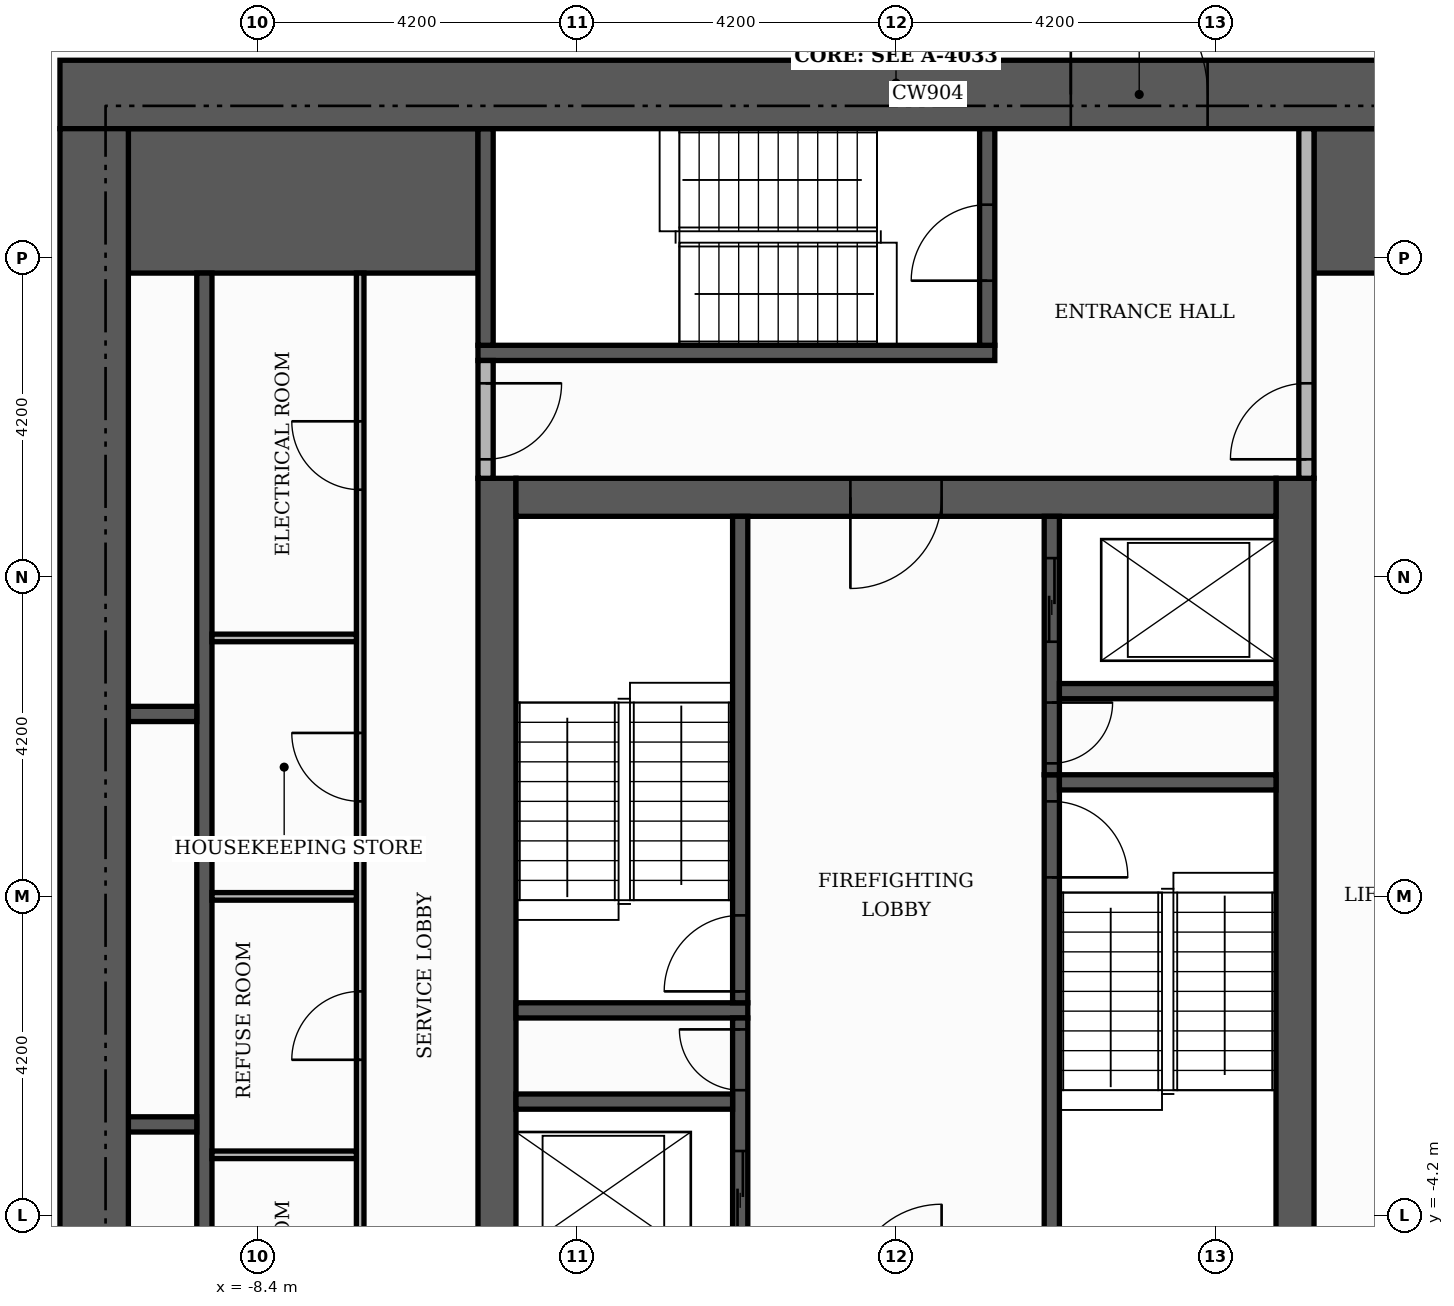
"""IFC4 building model, lengths in metres.
Left out: names, types, materials, properties, quantities, classifications, styles, units other than length and angle.
Written with IfcOpenShell. Run it as: python <this file> out.ifc"""

import sys

from ifc_helpers import new_model, si_unit, direction, frame, frame_2d, origin, place, context, subcontext, project, spatial, rectangle, extrude, element, fill, save


model = new_model("IFC4")
c1 = context("Model", 3, precision=1e-05, world=origin(), true_north=direction((0.0, 1.0)))
c2 = subcontext(c1, "Body", "Model", "MODEL_VIEW")
j1 = project(units=[si_unit("LENGTHUNIT", "METRE"), si_unit("PLANEANGLEUNIT", "RADIAN")], contexts=[c1])
p1 = place(None, origin())
s1 = spatial("IfcSite", under=j1, at=p1, CompositionType="ELEMENT")
p2 = place(p1, origin())
s2 = spatial("IfcBuilding", under=s1, at=p2, CompositionType="ELEMENT")
p3 = place(p2, frame((0.0, 0.0, 196.2)))
s3 = spatial("IfcBuildingStorey", under=s2, at=p3, CompositionType="ELEMENT", Elevation=196.2)
for number, where, z_axis, x_axis in (
    (1, (-5.25, -5.0, 0.0), (0.0, 0.0, 1.0), (0.0, 1.0, 0.0)),
    (2, (5.25, -5.0, 0.0), (0.0, 0.0, 1.0), (0.0, 1.0, 0.0)),
):
    element("IfcWall", number, at=place(p3, frame(where, z_axis=z_axis, x_axis=x_axis)), inside=s3, PredefinedType="SHEAR", context=c2, shape_type="SweptSolid", body=[
        extrude(rectangle(XDim=10.5, YDim=0.5, at=frame_2d((5.25, 0.0))), origin(), (0.0, 0.0, 1.0), 3.48),
    ])
p4 = place(p3, frame((-5.0, 5.25, 0.0), z_axis=(0.0, 0.0, 1.0), x_axis=(1.0, 0.0, 0.0)))
e3 = element("IfcWall", 3, at=p4, inside=s3, PredefinedType="SHEAR", context=c2, shape_type="SweptSolid", body=[
    extrude(rectangle(XDim=10.0, YDim=0.5, at=frame_2d((5.0, 0.0))), origin(), (0.0, 0.0, 1.0), 3.48),
])
p5 = place(p4, frame((4.4, 0.0, 0.0)))
e4 = element("IfcOpeningElement", 4, at=p5, cuts=e3, PredefinedType="OPENING", context=c2, shape_type="SweptSolid", body=[
    extrude(rectangle(XDim=1.2, YDim=2.1, at=frame_2d((0.6, 1.05))), frame((0.0, 0.26, 0.0), z_axis=(0.0, -1.0, 0.0), x_axis=(1.0, 0.0, 0.0)), (0.0, 0.0, 1.0), 0.52),
])
for number, where, z_axis, x_axis in (
    (5, (-10.1, 9.15, 0.0), (0.0, 0.0, 1.0), (1.0, 0.0, 0.0)),
    (6, (5.5, 9.15, 0.0), (0.0, 0.0, 1.0), (1.0, 0.0, 0.0)),
):
    element("IfcWall", number, at=place(p3, frame(where, z_axis=z_axis, x_axis=x_axis)), inside=s3, PredefinedType="SHEAR", context=c2, shape_type="SweptSolid", body=[
        extrude(rectangle(XDim=4.6, YDim=1.9, at=frame_2d((2.3, 0.0))), origin(), (0.0, 0.0, 1.0), 3.48),
    ])
p6 = place(p3, frame((2.05, -5.0, 0.0), z_axis=(0.0, 0.0, 1.0), x_axis=(0.0, 1.0, 0.0)))
e7 = element("IfcWall", 7, at=p6, inside=s3, PredefinedType="SHEAR", context=c2, shape_type="SweptSolid", body=[
    extrude(rectangle(XDim=6.6, YDim=0.2, at=frame_2d((3.3, 0.0))), origin(), (0.0, 0.0, 1.0), 3.48),
])
p7 = place(p6, frame((5.25, 0.0, 0.0)))
e8 = element("IfcOpeningElement", 8, at=p7, cuts=e7, PredefinedType="OPENING", context=c2, shape_type="SweptSolid", body=[
    extrude(rectangle(XDim=1.0, YDim=2.1, at=frame_2d((0.5, 1.05))), frame((0.0, 0.11, 0.0), z_axis=(0.0, -1.0, 0.0), x_axis=(1.0, 0.0, 0.0)), (0.0, 0.0, 1.0), 0.22),
])
p8 = place(p3, frame((-5.0, -1.5, 0.0), z_axis=(0.0, 0.0, 1.0), x_axis=(1.0, 0.0, 0.0)))
e9 = element("IfcWall", 9, at=p8, inside=s3, PredefinedType="SHEAR", context=c2, shape_type="SweptSolid", body=[
    extrude(rectangle(XDim=3.05, YDim=0.2, at=frame_2d((1.525, 0.0))), origin(), (0.0, 0.0, 1.0), 3.48),
])
p9 = place(p3, frame((-2.05, -1.4, 0.0), z_axis=(0.0, 0.0, 1.0), x_axis=(0.0, 1.0, 0.0)))
e10 = element("IfcWall", 10, at=p9, inside=s3, PredefinedType="SHEAR", context=c2, shape_type="SweptSolid", body=[
    extrude(rectangle(XDim=6.4, YDim=0.2, at=frame_2d((3.2, 0.0))), origin(), (0.0, 0.0, 1.0), 3.48),
])
p10 = place(p9, frame((0.15, 0.0, 0.0)))
e11 = element("IfcOpeningElement", 11, at=p10, cuts=e10, PredefinedType="OPENING", context=c2, shape_type="SweptSolid", body=[
    extrude(rectangle(XDim=1.0, YDim=2.1, at=frame_2d((0.5, 1.05))), frame((0.0, 0.11, 0.0), z_axis=(0.0, -1.0, 0.0), x_axis=(1.0, 0.0, 0.0)), (0.0, 0.0, 1.0), 0.22),
])
p11 = place(p3, frame((2.15, 1.5, 0.0), z_axis=(0.0, 0.0, 1.0), x_axis=(1.0, 0.0, 0.0)))
e12 = element("IfcWall", 12, at=p11, inside=s3, PredefinedType="SHEAR", context=c2, shape_type="SweptSolid", body=[
    extrude(rectangle(XDim=2.85, YDim=0.2, at=frame_2d((1.425, 0.0))), origin(), (0.0, 0.0, 1.0), 3.48),
])
p12 = place(p3, frame((-5.5, 7.15, 0.0), z_axis=(0.0, 0.0, 1.0), x_axis=(1.0, 0.0, 0.0)))
e13 = element("IfcWall", 13, at=p12, inside=s3, PredefinedType="SHEAR", context=c2, shape_type="SweptSolid", body=[
    extrude(rectangle(XDim=6.8, YDim=0.2, at=frame_2d((3.4, 0.0))), origin(), (0.0, 0.0, 1.0), 3.48),
])
p13 = place(p3, frame((-5.4, 7.25, 0.0), z_axis=(0.0, 0.0, 1.0), x_axis=(0.0, 1.0, 0.0)))
e14 = element("IfcWall", 14, at=p13, inside=s3, PredefinedType="SHEAR", context=c2, shape_type="SweptSolid", body=[
    extrude(rectangle(XDim=2.85, YDim=0.2, at=frame_2d((1.425, 0.0))), origin(), (0.0, 0.0, 1.0), 3.48),
])
p14 = place(p3, frame((1.2, 7.25, 0.0), z_axis=(0.0, 0.0, 1.0), x_axis=(0.0, 1.0, 0.0)))
e15 = element("IfcWall", 15, at=p14, inside=s3, PredefinedType="SHEAR", context=c2, shape_type="SweptSolid", body=[
    extrude(rectangle(XDim=2.85, YDim=0.2, at=frame_2d((1.425, 0.0))), origin(), (0.0, 0.0, 1.0), 3.48),
])
p15 = place(p14, frame((0.85, 0.0, 0.0)))
e16 = element("IfcOpeningElement", 16, at=p15, cuts=e15, PredefinedType="OPENING", context=c2, shape_type="SweptSolid", body=[
    extrude(rectangle(XDim=1.0, YDim=2.1, at=frame_2d((0.5, 1.05))), frame((0.0, 0.11, 0.0), z_axis=(0.0, -1.0, 0.0), x_axis=(1.0, 0.0, 0.0)), (0.0, 0.0, 1.0), 0.22),
])
p16 = place(p3, frame((-9.1, -8.2, 0.0), z_axis=(0.0, 0.0, 1.0), x_axis=(0.0, 1.0, 0.0)))
e17 = element("IfcWall", 17, at=p16, inside=s3, PredefinedType="SHEAR", context=c2, shape_type="SweptSolid", body=[
    extrude(rectangle(XDim=16.4, YDim=0.2, at=frame_2d((8.2, 0.0))), origin(), (0.0, 0.0, 1.0), 3.48),
])
p17 = place(p3, frame((-2.05, -5.0, 0.0), z_axis=(0.0, 0.0, 1.0), x_axis=(0.0, 1.0, 0.0)))
e18 = element("IfcWall", 18, at=p17, inside=s3, PredefinedType="SHEAR", context=c2, shape_type="SweptSolid", body=[
    extrude(rectangle(XDim=3.4, YDim=0.2, at=frame_2d((1.7, 0.0))), origin(), (0.0, 0.0, 1.0), 3.48),
])
p18 = place(p17, frame((0.55, 0.0, 0.0)))
e19 = element("IfcOpeningElement", 19, at=p18, cuts=e18, PredefinedType="OPENING", context=c2, shape_type="SweptSolid", body=[
    extrude(rectangle(XDim=1.1, YDim=2.1, at=frame_2d((0.55, 1.05))), frame((0.0, 0.11, 0.0), z_axis=(0.0, -1.0, 0.0), x_axis=(1.0, 0.0, 0.0)), (0.0, 0.0, 1.0), 0.22),
])
p19 = place(p17, frame((2.45, 0.0, 0.0)))
e20 = element("IfcOpeningElement", 20, at=p19, cuts=e18, PredefinedType="OPENING", context=c2, shape_type="SweptSolid", body=[
    extrude(rectangle(XDim=0.8, YDim=2.1, at=frame_2d((0.4, 1.05))), frame((0.0, 0.11, 0.0), z_axis=(0.0, -1.0, 0.0), x_axis=(1.0, 0.0, 0.0)), (0.0, 0.0, 1.0), 0.22),
])
p20 = place(p3, frame((-10.1, -3.0, 0.0), z_axis=(0.0, 0.0, 1.0), x_axis=(1.0, 0.0, 0.0)))
e21 = element("IfcWall", 21, at=p20, inside=s3, PredefinedType="SHEAR", context=c2, shape_type="SweptSolid", body=[
    extrude(rectangle(XDim=0.9, YDim=0.2, at=frame_2d((0.45, 0.0))), origin(), (0.0, 0.0, 1.0), 3.48),
])
p21 = place(p3, frame((-5.0, -2.7, 0.0), z_axis=(0.0, 0.0, 1.0), x_axis=(1.0, 0.0, 0.0)))
e22 = element("IfcWall", 22, at=p21, inside=s3, PredefinedType="SHEAR", context=c2, shape_type="SweptSolid", body=[
    extrude(rectangle(XDim=2.85, YDim=0.2, at=frame_2d((1.425, 0.0))), origin(), (0.0, 0.0, 1.0), 3.48),
])
p22 = place(p3, frame((2.05, 1.6, 0.0), z_axis=(0.0, 0.0, 1.0), x_axis=(0.0, 1.0, 0.0)))
e23 = element("IfcWall", 23, at=p22, inside=s3, PredefinedType="SHEAR", context=c2, shape_type="SweptSolid", body=[
    extrude(rectangle(XDim=3.4, YDim=0.2, at=frame_2d((1.7, 0.0))), origin(), (0.0, 0.0, 1.0), 3.48),
])
p23 = place(p22, frame((1.75, 0.0, 0.0)))
e24 = element("IfcOpeningElement", 24, at=p23, cuts=e23, PredefinedType="OPENING", context=c2, shape_type="SweptSolid", body=[
    extrude(rectangle(XDim=1.1, YDim=2.1, at=frame_2d((0.55, 1.05))), frame((0.0, 0.11, 0.0), z_axis=(0.0, -1.0, 0.0), x_axis=(1.0, 0.0, 0.0)), (0.0, 0.0, 1.0), 0.22),
])
p24 = place(p22, frame((0.15, 0.0, 0.0)))
e25 = element("IfcOpeningElement", 25, at=p24, cuts=e23, PredefinedType="OPENING", context=c2, shape_type="SweptSolid", body=[
    extrude(rectangle(XDim=0.8, YDim=2.1, at=frame_2d((0.4, 1.05))), frame((0.0, 0.11, 0.0), z_axis=(0.0, -1.0, 0.0), x_axis=(1.0, 0.0, 0.0)), (0.0, 0.0, 1.0), 0.22),
])
p25 = place(p3, frame((-10.1, 2.4, 0.0), z_axis=(0.0, 0.0, 1.0), x_axis=(1.0, 0.0, 0.0)))
e26 = element("IfcWall", 26, at=p25, inside=s3, PredefinedType="SHEAR", context=c2, shape_type="SweptSolid", body=[
    extrude(rectangle(XDim=0.9, YDim=0.2, at=frame_2d((0.45, 0.0))), origin(), (0.0, 0.0, 1.0), 3.48),
])
p26 = place(p3, frame((2.15, 2.7, 0.0), z_axis=(0.0, 0.0, 1.0), x_axis=(1.0, 0.0, 0.0)))
e27 = element("IfcWall", 27, at=p26, inside=s3, PredefinedType="SHEAR", context=c2, shape_type="SweptSolid", body=[
    extrude(rectangle(XDim=2.85, YDim=0.2, at=frame_2d((1.425, 0.0))), origin(), (0.0, 0.0, 1.0), 3.48),
])
p27 = place(p3, frame((-11.0, 10.55, 0.0), z_axis=(0.0, 0.0, 1.0), x_axis=(1.0, 0.0, 0.0)))
e28 = element("IfcWall", 28, at=p27, inside=s3, PredefinedType="SHEAR", context=c2, shape_type="SweptSolid", body=[
    extrude(rectangle(XDim=22.0, YDim=0.9, at=frame_2d((11.0, 0.0))), origin(), (0.0, 0.0, 1.0), 3.48),
])
p28 = place(p27, frame((13.3, 0.0, 0.0)))
e29 = element("IfcOpeningElement", 29, at=p28, cuts=e28, PredefinedType="OPENING", context=c2, shape_type="SweptSolid", body=[
    extrude(rectangle(XDim=1.8, YDim=2.2, at=frame_2d((0.9, 1.1))), frame((0.0, 0.46, 0.0), z_axis=(0.0, -1.0, 0.0), x_axis=(1.0, 0.0, 0.0)), (0.0, 0.0, 1.0), 0.92),
])
p29 = place(p3, frame((-10.55, -10.1, 0.0), z_axis=(0.0, 0.0, 1.0), x_axis=(0.0, 1.0, 0.0)))
e30 = element("IfcWall", 30, at=p29, inside=s3, PredefinedType="SHEAR", context=c2, shape_type="SweptSolid", body=[
    extrude(rectangle(XDim=20.2, YDim=0.9, at=frame_2d((10.1, 0.0))), origin(), (0.0, 0.0, 1.0), 3.48),
])
p30 = place(p3, frame((-7.05, -8.2, 0.0), z_axis=(0.0, 0.0, 1.0), x_axis=(0.0, 1.0, 0.0)))
e31 = element("IfcWall", 31, at=p30, inside=s3, PredefinedType="PARTITIONING", context=c2, shape_type="SweptSolid", body=[
    extrude(rectangle(XDim=16.4, YDim=0.1, at=frame_2d((8.2, 0.0))), origin(), (0.0, 0.0, 1.0), 3.48),
])
p31 = place(p30, frame((1.95, 0.0, 0.0)))
e32 = element("IfcOpeningElement", 32, at=p31, cuts=e31, PredefinedType="OPENING", context=c2, shape_type="SweptSolid", body=[
    extrude(rectangle(XDim=0.9, YDim=2.1, at=frame_2d((0.45, 1.05))), frame((0.0, 0.06, 0.0), z_axis=(0.0, -1.0, 0.0), x_axis=(1.0, 0.0, 0.0)), (0.0, 0.0, 1.0), 0.12),
])
p32 = place(p30, frame((6.05, 0.0, 0.0)))
e33 = element("IfcOpeningElement", 33, at=p32, cuts=e31, PredefinedType="OPENING", context=c2, shape_type="SweptSolid", body=[
    extrude(rectangle(XDim=0.9, YDim=2.1, at=frame_2d((0.45, 1.05))), frame((0.0, 0.06, 0.0), z_axis=(0.0, -1.0, 0.0), x_axis=(1.0, 0.0, 0.0)), (0.0, 0.0, 1.0), 0.12),
])
p33 = place(p30, frame((9.45, 0.0, 0.0)))
e34 = element("IfcOpeningElement", 34, at=p33, cuts=e31, PredefinedType="OPENING", context=c2, shape_type="SweptSolid", body=[
    extrude(rectangle(XDim=0.9, YDim=2.1, at=frame_2d((0.45, 1.05))), frame((0.0, 0.06, 0.0), z_axis=(0.0, -1.0, 0.0), x_axis=(1.0, 0.0, 0.0)), (0.0, 0.0, 1.0), 0.12),
])
p34 = place(p30, frame((13.55, 0.0, 0.0)))
e35 = element("IfcOpeningElement", 35, at=p34, cuts=e31, PredefinedType="OPENING", context=c2, shape_type="SweptSolid", body=[
    extrude(rectangle(XDim=0.9, YDim=2.1, at=frame_2d((0.45, 1.05))), frame((0.0, 0.06, 0.0), z_axis=(0.0, -1.0, 0.0), x_axis=(1.0, 0.0, 0.0)), (0.0, 0.0, 1.0), 0.12),
])
for number, where, z_axis, x_axis in (
    (36, (-9.0, -3.4, 0.0), (0.0, 0.0, 1.0), (1.0, 0.0, 0.0)),
    (37, (-9.0, 0.0, 0.0), (0.0, 0.0, 1.0), (1.0, 0.0, 0.0)),
    (38, (-9.0, 3.4, 0.0), (0.0, 0.0, 1.0), (1.0, 0.0, 0.0)),
):
    element("IfcWall", number, at=place(p3, frame(where, z_axis=z_axis, x_axis=x_axis)), inside=s3, PredefinedType="PARTITIONING", context=c2, shape_type="SweptSolid", body=[
        extrude(rectangle(XDim=1.9, YDim=0.1, at=frame_2d((0.95, 0.0))), origin(), (0.0, 0.0, 1.0), 3.48),
    ])
p35 = place(p3, frame((-5.4, 5.5, 0.0), z_axis=(0.0, 0.0, 1.0), x_axis=(0.0, 1.0, 0.0)))
e39 = element("IfcWall", 39, at=p35, inside=s3, PredefinedType="PARTITIONING", context=c2, shape_type="SweptSolid", body=[
    extrude(rectangle(XDim=1.55, YDim=0.2, at=frame_2d((0.775, 0.0))), origin(), (0.0, 0.0, 1.0), 3.48),
])
p36 = place(p35, frame((0.25, 0.0, 0.0)))
e40 = element("IfcOpeningElement", 40, at=p36, cuts=e39, PredefinedType="OPENING", context=c2, shape_type="SweptSolid", body=[
    extrude(rectangle(XDim=1.0, YDim=2.1, at=frame_2d((0.5, 1.05))), frame((0.0, 0.11, 0.0), z_axis=(0.0, -1.0, 0.0), x_axis=(1.0, 0.0, 0.0)), (0.0, 0.0, 1.0), 0.22),
])
p37 = place(p3, frame((5.4, 5.5, 0.0), z_axis=(0.0, 0.0, 1.0), x_axis=(0.0, 1.0, 0.0)))
e41 = element("IfcWall", 41, at=p37, inside=s3, PredefinedType="PARTITIONING", context=c2, shape_type="SweptSolid", body=[
    extrude(rectangle(XDim=4.6, YDim=0.2, at=frame_2d((2.3, 0.0))), origin(), (0.0, 0.0, 1.0), 3.48),
])
p38 = place(p37, frame((0.25, 0.0, 0.0)))
e42 = element("IfcOpeningElement", 42, at=p38, cuts=e41, PredefinedType="OPENING", context=c2, shape_type="SweptSolid", body=[
    extrude(rectangle(XDim=1.0, YDim=2.1, at=frame_2d((0.5, 1.05))), frame((0.0, 0.11, 0.0), z_axis=(0.0, -1.0, 0.0), x_axis=(1.0, 0.0, 0.0)), (0.0, 0.0, 1.0), 0.22),
])
p39 = place(p23, origin())
e43 = element("IfcDoor", 43, at=p39, inside=s3, OperationType="SLIDING_TO_LEFT", PredefinedType="DOOR", context=c2, shape_type="SweptSolid", body=[
    extrude(rectangle(XDim=1.1, YDim=2.1, at=frame_2d((0.55, 1.05))), frame((0.0, 0.025, 0.0), z_axis=(0.0, -1.0, 0.0), x_axis=(1.0, 0.0, 0.0)), (0.0, 0.0, 1.0), 0.05),
])
fill(e24, e43)
p40 = place(p18, origin())
e44 = element("IfcDoor", 44, at=p40, inside=s3, OperationType="SLIDING_TO_LEFT", PredefinedType="DOOR", context=c2, shape_type="SweptSolid", body=[
    extrude(rectangle(XDim=1.1, YDim=2.1, at=frame_2d((0.55, 1.05))), frame((0.0, 0.025, 0.0), z_axis=(0.0, -1.0, 0.0), x_axis=(1.0, 0.0, 0.0)), (0.0, 0.0, 1.0), 0.05),
])
fill(e19, e44)
p41 = place(p10, origin())
e45 = element("IfcDoor", 45, at=p41, inside=s3, OperationType="SINGLE_SWING_LEFT", PredefinedType="DOOR", context=c2, shape_type="SweptSolid", body=[
    extrude(rectangle(XDim=1.0, YDim=2.1, at=frame_2d((0.5, 1.05))), frame((0.0, 0.025, 0.0), z_axis=(0.0, -1.0, 0.0), x_axis=(1.0, 0.0, 0.0)), (0.0, 0.0, 1.0), 0.05),
])
fill(e11, e45)
p42 = place(p7, frame((1.0, 0.0, 0.0), z_axis=(0.0, 0.0, 1.0), x_axis=(-1.0, 0.0, 0.0)))
e46 = element("IfcDoor", 46, at=p42, inside=s3, OperationType="SINGLE_SWING_LEFT", PredefinedType="DOOR", context=c2, shape_type="SweptSolid", body=[
    extrude(rectangle(XDim=1.0, YDim=2.1, at=frame_2d((0.5, 1.05))), frame((0.0, 0.025, 0.0), z_axis=(0.0, -1.0, 0.0), x_axis=(1.0, 0.0, 0.0)), (0.0, 0.0, 1.0), 0.05),
])
fill(e8, e46)
p43 = place(p24, frame((0.8, 0.0, 0.0), z_axis=(0.0, 0.0, 1.0), x_axis=(-1.0, 0.0, 0.0)))
e47 = element("IfcDoor", 47, at=p43, inside=s3, OperationType="SINGLE_SWING_RIGHT", PredefinedType="DOOR", context=c2, shape_type="SweptSolid", body=[
    extrude(rectangle(XDim=0.8, YDim=2.1, at=frame_2d((0.4, 1.05))), frame((0.0, 0.025, 0.0), z_axis=(0.0, -1.0, 0.0), x_axis=(1.0, 0.0, 0.0)), (0.0, 0.0, 1.0), 0.05),
])
fill(e25, e47)
p44 = place(p19, origin())
e48 = element("IfcDoor", 48, at=p44, inside=s3, OperationType="SINGLE_SWING_RIGHT", PredefinedType="DOOR", context=c2, shape_type="SweptSolid", body=[
    extrude(rectangle(XDim=0.8, YDim=2.1, at=frame_2d((0.4, 1.05))), frame((0.0, 0.025, 0.0), z_axis=(0.0, -1.0, 0.0), x_axis=(1.0, 0.0, 0.0)), (0.0, 0.0, 1.0), 0.05),
])
fill(e20, e48)
p45 = place(p5, frame((1.2, 0.0, 0.0), z_axis=(0.0, 0.0, 1.0), x_axis=(-1.0, 0.0, 0.0)))
e49 = element("IfcDoor", 49, at=p45, inside=s3, OperationType="SINGLE_SWING_LEFT", PredefinedType="DOOR", context=c2, shape_type="SweptSolid", body=[
    extrude(rectangle(XDim=1.2, YDim=2.1, at=frame_2d((0.6, 1.05))), frame((0.0, 0.025, 0.0), z_axis=(0.0, -1.0, 0.0), x_axis=(1.0, 0.0, 0.0)), (0.0, 0.0, 1.0), 0.05),
])
fill(e4, e49)
p46 = place(p15, origin())
e50 = element("IfcDoor", 50, at=p46, inside=s3, OperationType="SINGLE_SWING_LEFT", PredefinedType="DOOR", context=c2, shape_type="SweptSolid", body=[
    extrude(rectangle(XDim=1.0, YDim=2.1, at=frame_2d((0.5, 1.05))), frame((0.0, 0.025, 0.0), z_axis=(0.0, -1.0, 0.0), x_axis=(1.0, 0.0, 0.0)), (0.0, 0.0, 1.0), 0.05),
])
fill(e16, e50)
p47 = place(p36, frame((1.0, 0.0, 0.0), z_axis=(0.0, 0.0, 1.0), x_axis=(-1.0, 0.0, 0.0)))
e51 = element("IfcDoor", 51, at=p47, inside=s3, OperationType="SINGLE_SWING_RIGHT", PredefinedType="DOOR", context=c2, shape_type="SweptSolid", body=[
    extrude(rectangle(XDim=1.0, YDim=2.1, at=frame_2d((0.5, 1.05))), frame((0.0, 0.025, 0.0), z_axis=(0.0, -1.0, 0.0), x_axis=(1.0, 0.0, 0.0)), (0.0, 0.0, 1.0), 0.05),
])
fill(e40, e51)
p48 = place(p38, origin())
e52 = element("IfcDoor", 52, at=p48, inside=s3, OperationType="SINGLE_SWING_LEFT", PredefinedType="DOOR", context=c2, shape_type="SweptSolid", body=[
    extrude(rectangle(XDim=1.0, YDim=2.1, at=frame_2d((0.5, 1.05))), frame((0.0, 0.025, 0.0), z_axis=(0.0, -1.0, 0.0), x_axis=(1.0, 0.0, 0.0)), (0.0, 0.0, 1.0), 0.05),
])
fill(e42, e52)
p49 = place(p28, origin())
e53 = element("IfcDoor", 53, at=p49, inside=s3, OperationType="DOUBLE_DOOR_SINGLE_SWING", PredefinedType="DOOR", context=c2, shape_type="SweptSolid", body=[
    extrude(rectangle(XDim=1.8, YDim=2.2, at=frame_2d((0.9, 1.1))), frame((0.0, 0.025, 0.0), z_axis=(0.0, -1.0, 0.0), x_axis=(1.0, 0.0, 0.0)), (0.0, 0.0, 1.0), 0.05),
])
fill(e29, e53)
p50 = place(p32, origin())
e54 = element("IfcDoor", 54, at=p50, inside=s3, OperationType="SINGLE_SWING_LEFT", PredefinedType="DOOR", context=c2, shape_type="SweptSolid", body=[
    extrude(rectangle(XDim=0.9, YDim=2.1, at=frame_2d((0.45, 1.05))), frame((0.0, 0.025, 0.0), z_axis=(0.0, -1.0, 0.0), x_axis=(1.0, 0.0, 0.0)), (0.0, 0.0, 1.0), 0.05),
])
fill(e33, e54)
p51 = place(p33, origin())
e55 = element("IfcDoor", 55, at=p51, inside=s3, OperationType="SINGLE_SWING_RIGHT", PredefinedType="DOOR", context=c2, shape_type="SweptSolid", body=[
    extrude(rectangle(XDim=0.9, YDim=2.1, at=frame_2d((0.45, 1.05))), frame((0.0, 0.025, 0.0), z_axis=(0.0, -1.0, 0.0), x_axis=(1.0, 0.0, 0.0)), (0.0, 0.0, 1.0), 0.05),
])
fill(e34, e55)
p52 = place(p34, origin())
e56 = element("IfcDoor", 56, at=p52, inside=s3, OperationType="SINGLE_SWING_RIGHT", PredefinedType="DOOR", context=c2, shape_type="SweptSolid", body=[
    extrude(rectangle(XDim=0.9, YDim=2.1, at=frame_2d((0.45, 1.05))), frame((0.0, 0.025, 0.0), z_axis=(0.0, -1.0, 0.0), x_axis=(1.0, 0.0, 0.0)), (0.0, 0.0, 1.0), 0.05),
])
fill(e35, e56)
save(model, sys.argv[1])
